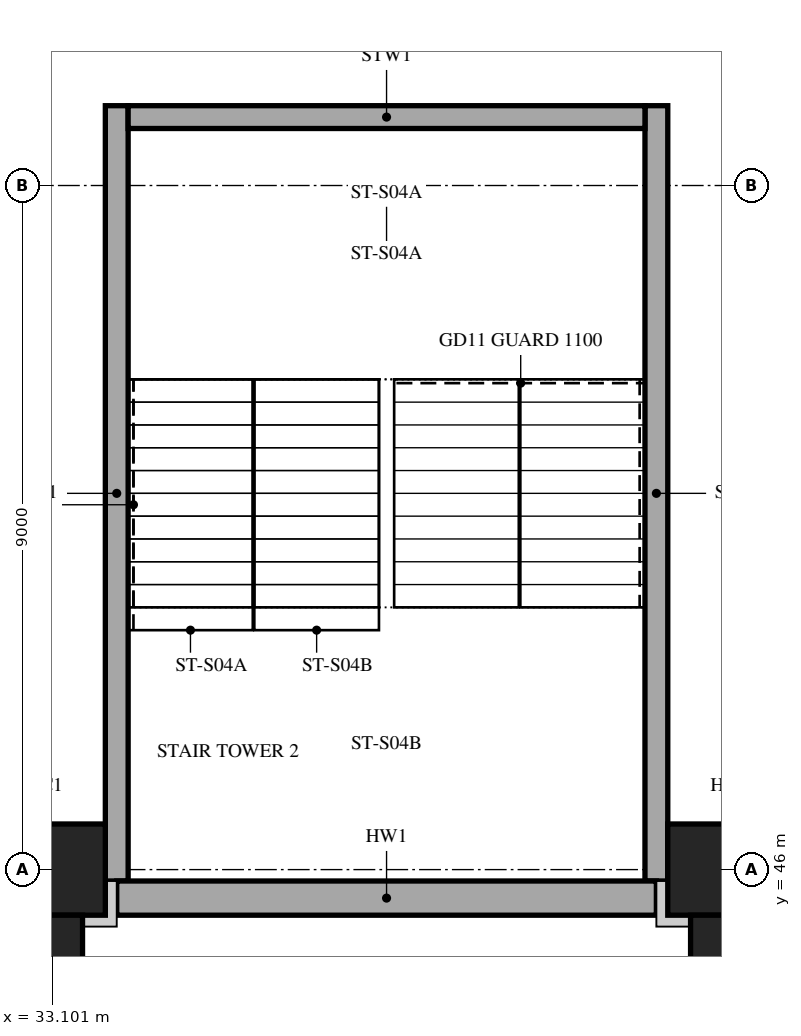
"""IFC4 building model, lengths in metres.
Left out: names, types, materials, properties, quantities, classifications, styles, units other than length and angle.
Written with IfcOpenShell. Run it as: python <this file> out.ifc"""

import sys

from ifc_helpers import new_model, si_unit, direction, frame, frame_2d, origin, origin_2d, place, context, subcontext, project, spatial, rectangle, extrude, element, save


model = new_model("IFC4")
c1 = context("Model", 3, precision=1e-05, world=origin(), true_north=direction((0.0, 1.0)))
c2 = subcontext(c1, "Body", "Model", "MODEL_VIEW")
j1 = project(units=[si_unit("LENGTHUNIT", "METRE"), si_unit("PLANEANGLEUNIT", "RADIAN")], contexts=[c1])
p1 = place(None, origin())
s1 = spatial("IfcSite", under=j1, at=p1, CompositionType="ELEMENT")
p2 = place(p1, origin())
s2 = spatial("IfcBuilding", under=s1, at=p2, CompositionType="ELEMENT")
p3 = place(p2, frame((0.0, 0.0, 10.0)))
s3 = spatial("IfcBuildingStorey", under=s2, at=p3, CompositionType="ELEMENT", Elevation=10.0)
for number, where, z_axis, x_axis in (
    (1, (33.0, 46.0, 0.0), (0.0, 0.0, 1.0), (1.0, 0.0, 0.0)),
    (2, (42.0, 46.0, 0.0), (0.0, 0.0, 1.0), (1.0, 0.0, 0.0)),
):
    element("IfcColumn", number, at=place(p3, frame(where, z_axis=z_axis, x_axis=x_axis)), inside=s3, PredefinedType="COLUMN", context=c2, shape_type="SweptSolid", body=[
        extrude(rectangle(XDim=1.6, YDim=1.2, at=origin_2d()), origin(), (0.0, 0.0, 1.0), 5.0),
    ])
for number, where, z_axis, x_axis in (
    (3, (33.95, 45.85, 0.0), (0.0, 0.0, 1.0), (0.0, 1.0, 0.0)),
    (4, (41.05, 45.85, 0.0), (0.0, 0.0, 1.0), (0.0, 1.0, 0.0)),
):
    element("IfcWall", number, at=place(p3, frame(where, z_axis=z_axis, x_axis=x_axis)), inside=s3, PredefinedType="SHEAR", context=c2, shape_type="SweptSolid", body=[
        extrude(rectangle(XDim=10.2, YDim=0.3, at=frame_2d((5.1, 0.0))), origin(), (0.0, 0.0, 1.0), 5.0),
    ])
p4 = place(p3, frame((34.1, 55.9, 0.0), z_axis=(0.0, 0.0, 1.0), x_axis=(1.0, 0.0, 0.0)))
e5 = element("IfcWall", 5, at=p4, inside=s3, PredefinedType="SHEAR", context=c2, shape_type="SweptSolid", body=[
    extrude(rectangle(XDim=6.8, YDim=0.3, at=frame_2d((3.4, 0.0))), origin(), (0.0, 0.0, 1.0), 5.0),
])
for number, where, z_axis, x_axis in (
    (6, (33.0, 44.9, 0.0), (0.0, 0.0, 1.0), (1.0, 0.0, 0.0)),
    (7, (42.0, 44.9, 0.0), (0.0, 0.0, 1.0), (1.0, 0.0, 0.0)),
):
    element("IfcColumn", number, at=place(p3, frame(where, z_axis=z_axis, x_axis=x_axis)), inside=s3, PredefinedType="COLUMN", context=c2, shape_type="SweptSolid", body=[
        extrude(rectangle(XDim=1.0, YDim=1.0, at=origin_2d()), origin(), (0.0, 0.0, 1.0), 3.4),
    ])
p5 = place(p3, frame((33.95, 45.625, 0.0), z_axis=(0.0, 0.0, 1.0), x_axis=(1.0, 0.0, 0.0)))
e8 = element("IfcWall", 8, at=p5, inside=s3, PredefinedType="SOLIDWALL", context=c2, shape_type="SweptSolid", body=[
    extrude(rectangle(XDim=7.1, YDim=0.45, at=frame_2d((3.55, 0.0))), origin(), (0.0, 0.0, 1.0), 5.0),
])
save(model, sys.argv[1])
